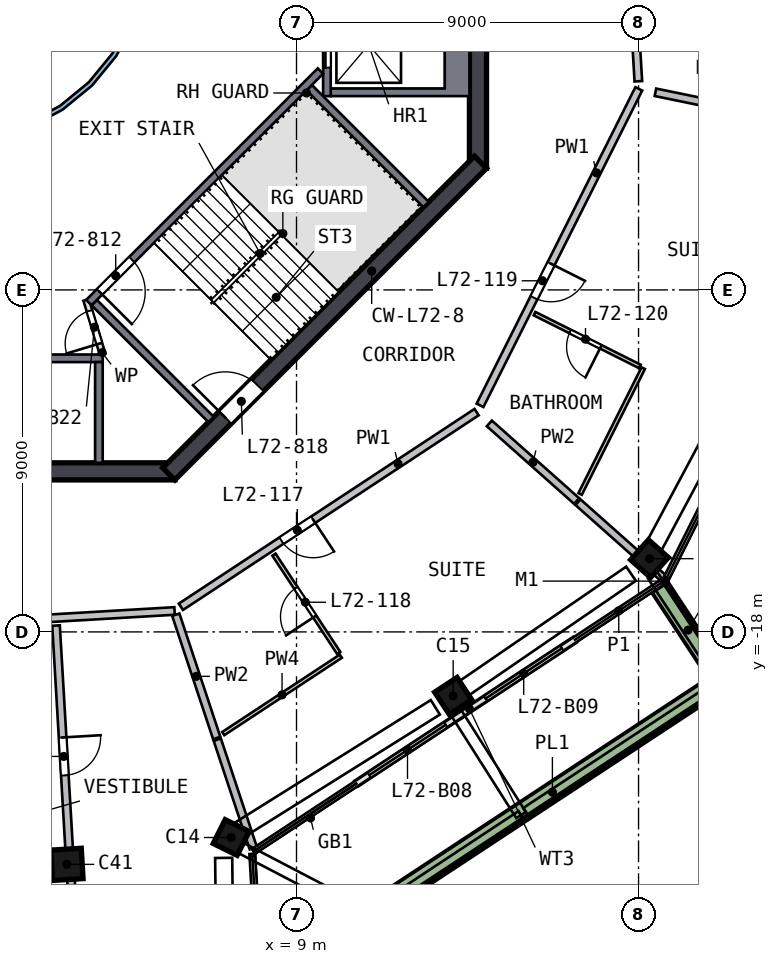
"""IFC4 building model, lengths in metres.
Left out: names, types, materials, properties, quantities, classifications, styles, units other than length and angle.
Written with IfcOpenShell. Run it as: python <this file> out.ifc"""

import sys

from ifc_helpers import new_model, si_unit, direction, frame, frame_2d, origin, origin_2d, place, context, subcontext, project, spatial, polyline, rectangle, outline, extrude, element, fill, save


model = new_model("IFC4")
c1 = context("Model", 3, precision=1e-05, world=origin(), true_north=direction((0.0, 1.0)))
c2 = subcontext(c1, "Body", "Model", "MODEL_VIEW")
j1 = project(units=[si_unit("LENGTHUNIT", "METRE"), si_unit("PLANEANGLEUNIT", "RADIAN")], contexts=[c1])
p1 = place(None, origin())
s1 = spatial("IfcSite", under=j1, at=p1, CompositionType="ELEMENT")
p2 = place(p1, origin())
s2 = spatial("IfcBuilding", under=s1, at=p2, CompositionType="ELEMENT")
p3 = place(p2, frame((0.0, 0.0, 291.5)))
s3 = spatial("IfcBuildingStorey", under=s2, at=p3, CompositionType="ELEMENT", Elevation=291.5)
p4 = place(p3, frame((7.147, -23.452, 0.0), z_axis=(0.111206882, 0.034889924, 0.993184637), x_axis=(-0.440961919, -0.893883559, 0.080776048)))
e1 = element("IfcColumn", 1, at=p4, inside=s3, PredefinedType="COLUMN", context=c2, shape_type="SweptSolid", body=[
    extrude(rectangle(XDim=0.7, YDim=0.7, at=origin_2d()), origin(), (0.0, 0.0, 1.0), 3.212),
])
p5 = place(p3, frame((13.01, -19.76, 0.0), z_axis=(0.093463516, 0.062663903, 0.993648734), x_axis=(0.829982551, 0.546321949, -0.112522412)))
e2 = element("IfcColumn", 2, at=p5, inside=s3, PredefinedType="COLUMN", context=c2, shape_type="SweptSolid", body=[
    extrude(rectangle(XDim=0.7, YDim=0.7, at=origin_2d()), origin(), (0.0, 0.0, 1.0), 3.21),
])
p6 = place(p3, frame((18.196, -16.178, 0.0), z_axis=(0.076247429, 0.087194218, 0.993269096), x_axis=(-0.660166681, -0.742135032, 0.115825506)))
e3 = element("IfcColumn", 3, at=p6, inside=s3, PredefinedType="COLUMN", context=c2, shape_type="SweptSolid", body=[
    extrude(rectangle(XDim=0.7, YDim=0.7, at=origin_2d()), origin(), (0.0, 0.0, 1.0), 3.212),
])
p7 = place(p3, frame((2.819, -24.135, 0.0), z_axis=(0.114641131, 0.014368152, 0.993303059), x_axis=(0.059498307, -0.998199687, 0.007572042)))
e4 = element("IfcColumn", 4, at=p7, inside=s3, PredefinedType="COLUMN", context=c2, shape_type="SweptSolid", body=[
    extrude(rectangle(XDim=0.8, YDim=0.8, at=origin_2d()), origin(), (0.0, 0.0, 1.0), 3.211),
])
p8 = place(p3, frame((13.775, -5.799, 0.0), z_axis=(0.0, 0.0, 1.0), x_axis=(0.0, 1.0, 0.0)))
e5 = element("IfcWall", 5, at=p8, inside=s3, PredefinedType="SHEAR", context=c2, shape_type="SweptSolid", body=[
    extrude(rectangle(XDim=11.598, YDim=0.45, at=frame_2d((5.799, 0.0))), origin(), (0.0, 0.0, 1.0), 3.5),
])
p9 = place(p8, frame((4.899, 0.0, 0.0)))
e6 = element("IfcOpeningElement", 6, at=p9, cuts=e5, PredefinedType="OPENING", context=c2, shape_type="SweptSolid", body=[
    extrude(rectangle(XDim=1.8, YDim=2.1, at=frame_2d((0.9, 1.05))), frame((0.0, 0.235, 0.0), z_axis=(0.0, -1.0, 0.0), x_axis=(1.0, 0.0, 0.0)), (0.0, 0.0, 1.0), 0.47),
])
p10 = place(p3, frame((-5.799, -13.775, 0.0), z_axis=(0.0, 0.0, 1.0), x_axis=(1.0, 0.0, 0.0)))
e7 = element("IfcWall", 7, at=p10, inside=s3, PredefinedType="SHEAR", context=c2, shape_type="SweptSolid", body=[
    extrude(rectangle(XDim=11.598, YDim=0.45, at=frame_2d((5.799, 0.0))), origin(), (0.0, 0.0, 1.0), 3.5),
])
p11 = place(p3, frame((5.64, -13.841, 0.0), z_axis=(0.0, 0.0, 1.0), x_axis=(0.707106781, 0.707106781, 0.0)))
e8 = element("IfcWall", 8, at=p11, inside=s3, PredefinedType="SHEAR", context=c2, shape_type="SweptSolid", body=[
    extrude(rectangle(XDim=11.598, YDim=0.45, at=frame_2d((5.799, 0.0))), origin(), (0.0, 0.0, 1.0), 3.5),
])
p12 = place(p11, frame((2.099, 0.0, 0.0)))
e9 = element("IfcOpeningElement", 9, at=p12, cuts=e8, PredefinedType="OPENING", context=c2, shape_type="SweptSolid", body=[
    extrude(rectangle(XDim=1.2, YDim=2.1, at=frame_2d((0.6, 1.05))), frame((0.0, 0.235, 0.0), z_axis=(0.0, -1.0, 0.0), x_axis=(1.0, 0.0, 0.0)), (0.0, 0.0, 1.0), 0.47),
])
p13 = place(p3, frame((10.584, -21.986, 0.0), z_axis=(0.0, 0.0, 1.0), x_axis=(0.835249124, 0.549871714, 0.0)))
e10 = element("IfcWall", 10, at=p13, inside=s3, PredefinedType="SOLIDWALL", context=c2, shape_type="SweptSolid", body=[
    extrude(rectangle(XDim=3.25, YDim=0.15, at=frame_2d((1.625, 0.0))), origin(), (0.0, 0.0, 1.0), 2.525),
])
p14 = place(p13, frame((0.4, 0.0, 0.0)))
e11 = element("IfcOpeningElement", 11, at=p14, cuts=e10, PredefinedType="OPENING", context=c2, shape_type="SweptSolid", body=[
    extrude(rectangle(XDim=2.4, YDim=2.4, at=frame_2d((1.2, 1.2))), frame((0.0, 0.085, 0.0), z_axis=(0.0, -1.0, 0.0), x_axis=(1.0, 0.0, 0.0)), (0.0, 0.0, 1.0), 0.17),
])
p15 = place(p3, frame((13.298, -20.199, 0.0), z_axis=(0.0, 0.0, 1.0), x_axis=(0.83523978, 0.549885906, 0.0)))
e12 = element("IfcWall", 12, at=p15, inside=s3, PredefinedType="SOLIDWALL", context=c2, shape_type="SweptSolid", body=[
    extrude(rectangle(XDim=3.611, YDim=0.15, at=frame_2d((1.806, 0.0))), origin(), (0.0, 0.0, 1.0), 2.525),
])
p16 = place(p15, frame((0.811, 0.0, 0.0)))
e13 = element("IfcOpeningElement", 13, at=p16, cuts=e12, PredefinedType="OPENING", context=c2, shape_type="SweptSolid", body=[
    extrude(rectangle(XDim=2.4, YDim=2.4, at=frame_2d((1.2, 1.2))), frame((0.0, 0.085, 0.0), z_axis=(0.0, -1.0, 0.0), x_axis=(1.0, 0.0, 0.0)), (0.0, 0.0, 1.0), 0.17),
])
p17 = place(p3, frame((11.076, -25.284, 0.0), z_axis=(0.0, 0.0, 1.0), x_axis=(0.83522923, 0.549901931, 0.0)))
e14 = element("IfcWall", 14, at=p17, inside=s3, PredefinedType="SOLIDWALL", context=c2, shape_type="SweptSolid", body=[
    extrude(rectangle(XDim=11.153, YDim=0.5, at=frame_2d((5.576, 0.0))), origin(), (0.0, 0.0, 1.0), 0.7),
])
p18 = place(p3, frame((20.044, -19.08, 0.0), z_axis=(0.0, 0.0, 1.0), x_axis=(-0.549868995, 0.835250913, 0.0)))
e15 = element("IfcWall", 15, at=p18, inside=s3, PredefinedType="SOLIDWALL", context=c2, shape_type="SweptSolid", body=[
    extrude(rectangle(XDim=2.699, YDim=0.5, at=frame_2d((1.35, 0.0))), origin(), (0.0, 0.0, 1.0), 0.7),
])
p19 = place(p3, origin())
e16 = element("IfcWall", 16, at=p19, inside=s3, PredefinedType="SOLIDWALL", context=c2, shape_type="SweptSolid", body=[
    extrude(outline(polyline([(13.55, -3.9), (9.9, -3.9), (9.9, -3.7), (12.9, -3.7), (12.9, -1.4), (9.9, -1.4), (9.9, -1.2), (13.55, -1.2), (13.55, -3.9)])), origin(), (0.0, 0.0, 1.0), 3.19),
])
p20 = place(p3, frame((9.8, -1.2, 0.0), z_axis=(0.0, 0.0, 1.0), x_axis=(0.0, -1.0, 0.0)))
e17 = element("IfcWall", 17, at=p20, inside=s3, PredefinedType="SOLIDWALL", context=c2, shape_type="SweptSolid", body=[
    extrude(rectangle(XDim=2.7, YDim=0.2, at=frame_2d((1.35, 0.0))), origin(), (0.0, 0.0, 1.0), 3.19),
])
p21 = place(p20, frame((0.75, 0.0, 0.0)))
e18 = element("IfcOpeningElement", 18, at=p21, cuts=e17, PredefinedType="OPENING", context=c2, shape_type="SweptSolid", body=[
    extrude(rectangle(XDim=1.2, YDim=2.1, at=frame_2d((0.6, 1.05))), frame((0.0, 0.11, 0.0), z_axis=(0.0, -1.0, 0.0), x_axis=(1.0, 0.0, 0.0)), (0.0, 0.0, 1.0), 0.22),
])
p22 = place(p3, frame((-3.9, -10.8, 0.0), z_axis=(0.0, 0.0, 1.0), x_axis=(1.0, 0.0, 0.0)))
e19 = element("IfcWall", 19, at=p22, inside=s3, PredefinedType="SOLIDWALL", context=c2, shape_type="SweptSolid", body=[
    extrude(rectangle(XDim=7.8, YDim=0.2, at=frame_2d((3.9, 0.0))), origin(), (0.0, 0.0, 1.0), 3.19),
])
p23 = place(p22, frame((3.45, 0.0, 0.0)))
e20 = element("IfcOpeningElement", 20, at=p23, cuts=e19, PredefinedType="OPENING", context=c2, shape_type="SweptSolid", body=[
    extrude(rectangle(XDim=0.9, YDim=2.1, at=frame_2d((0.45, 1.05))), frame((0.0, 0.11, 0.0), z_axis=(0.0, -1.0, 0.0), x_axis=(1.0, 0.0, 0.0)), (0.0, 0.0, 1.0), 0.22),
])
p24 = place(p3, frame((3.8, -10.9, 0.0), z_axis=(0.0, 0.0, 1.0), x_axis=(0.0, -1.0, 0.0)))
e21 = element("IfcWall", 21, at=p24, inside=s3, PredefinedType="SOLIDWALL", context=c2, shape_type="SweptSolid", body=[
    extrude(rectangle(XDim=2.65, YDim=0.2, at=frame_2d((1.325, 0.0))), origin(), (0.0, 0.0, 1.0), 3.19),
])
p25 = place(p3, frame((9.629, -3.24, 0.0), z_axis=(0.0, 0.0, 1.0), x_axis=(-0.707120946, -0.707092617, 0.0)))
e22 = element("IfcWall", 22, at=p25, inside=s3, PredefinedType="SOLIDWALL", context=c2, shape_type="SweptSolid", body=[
    extrude(rectangle(XDim=8.618, YDim=0.2, at=frame_2d((4.309, 0.0))), origin(), (0.0, 0.0, 1.0), 3.19),
])
p26 = place(p25, frame((7.018, 0.0, 0.0)))
e23 = element("IfcOpeningElement", 23, at=p26, cuts=e22, PredefinedType="OPENING", context=c2, shape_type="SweptSolid", body=[
    extrude(rectangle(XDim=1.2, YDim=2.1, at=frame_2d((0.6, 1.05))), frame((0.0, 0.11, 0.0), z_axis=(0.0, -1.0, 0.0), x_axis=(1.0, 0.0, 0.0)), (0.0, 0.0, 1.0), 0.22),
])
for number, where, z_axis, x_axis in (
    (24, (3.677, -9.334, 0.0), (0.0, 0.0, 1.0), (0.707, -0.707, 0.0)),
    (25, (9.334, -3.677, 0.0), (0.0, 0.0, 1.0), (0.707, -0.707, 0.0)),
):
    element("IfcWall", number, at=place(p3, frame(where, z_axis=z_axis, x_axis=x_axis)), inside=s3, PredefinedType="SOLIDWALL", context=c2, shape_type="SweptSolid", body=[
        extrude(rectangle(XDim=4.35, YDim=0.2, at=frame_2d((2.175, 0.0))), origin(), (0.0, 0.0, 1.0), 3.19),
    ])
p27 = place(p3, frame((3.9, -10.7, 0.0), z_axis=(0.0, 0.0, 1.0), x_axis=(-0.289808785, 0.957084567, 0.0)))
e26 = element("IfcWall", 26, at=p27, inside=s3, PredefinedType="PARTITIONING", context=c2, shape_type="SweptSolid", body=[
    extrude(rectangle(XDim=1.501, YDim=0.15, at=frame_2d((0.75, 0.0))), origin(), (0.0, 0.0, 1.0), 3.19),
])
p28 = place(p27, frame((0.301, 0.0, 0.0)))
e27 = element("IfcOpeningElement", 27, at=p28, cuts=e26, PredefinedType="OPENING", context=c2, shape_type="SweptSolid", body=[
    extrude(rectangle(XDim=0.9, YDim=2.1, at=frame_2d((0.45, 1.05))), frame((0.0, 0.085, 0.0), z_axis=(0.0, -1.0, 0.0), x_axis=(1.0, 0.0, 0.0)), (0.0, 0.0, 1.0), 0.17),
])
p29 = place(p3, origin())
e28 = element("IfcWall", 28, at=p29, inside=s3, PredefinedType="SOLIDWALL", context=c2, shape_type="SweptSolid", body=[
    extrude(outline(polyline([(5.021, -0.999), (4.73, -1.959), (4.257, -2.844), (3.62, -3.62), (2.844, -4.257), (1.959, -4.73), (0.999, -5.021), (0.0, -5.12), (-0.999, -5.021), (-1.959, -4.73), (-2.844, -4.257), (-3.62, -3.62), (-4.257, -2.844), (-4.73, -1.959), (-5.021, -0.999), (-5.12, 0.0), (-5.021, 0.999), (-4.73, 1.959), (-4.257, 2.844), (-3.62, 3.62), (-2.844, 4.257), (-1.959, 4.73), (-0.999, 5.021), (0.0, 5.12), (0.999, 5.021), (1.959, 4.73), (2.844, 4.257), (3.62, 3.62), (4.257, 2.844), (4.73, 1.959), (5.021, 0.999), (5.12, 0.0), (5.021, -0.999)]), holes=[polyline([(4.904, 0.976), (4.619, 1.913), (4.157, 2.778), (3.535, 3.535), (2.778, 4.157), (1.913, 4.619), (0.976, 4.904), (0.0, 5.0), (-0.976, 4.904), (-1.913, 4.619), (-2.778, 4.157), (-3.535, 3.535), (-4.157, 2.778), (-4.619, 1.913), (-4.904, 0.976), (-5.0, 0.0), (-4.904, -0.976), (-4.619, -1.913), (-4.157, -2.778), (-3.535, -3.535), (-2.778, -4.157), (-1.913, -4.619), (-0.976, -4.904), (0.0, -5.0), (0.976, -4.904), (1.913, -4.619), (2.778, -4.157), (3.535, -3.535), (4.157, -2.778), (4.619, -1.913), (4.904, -0.976), (5.0, 0.0), (4.904, 0.976)])]), origin(), (0.0, 0.0, 1.0), 3.19),
])
p30 = place(p3, frame((5.791, -17.449, 0.0), z_axis=(0.0, 0.0, 1.0), x_axis=(-0.998281884, -0.058594193, 0.0)))
e29 = element("IfcWall", 29, at=p30, inside=s3, PredefinedType="SOLIDWALL", context=c2, shape_type="SweptSolid", body=[
    extrude(rectangle(XDim=9.517, YDim=0.2, at=frame_2d((4.758, 0.0))), origin(), (0.0, 0.0, 1.0), 3.19),
])
p31 = place(p30, frame((3.836, 0.0, 0.0)))
e30 = element("IfcOpeningElement", 30, at=p31, cuts=e29, PredefinedType="OPENING", context=c2, shape_type="SweptSolid", body=[
    extrude(rectangle(XDim=1.8, YDim=2.1, at=frame_2d((0.9, 1.05))), frame((0.0, 0.11, 0.0), z_axis=(0.0, -1.0, 0.0), x_axis=(1.0, 0.0, 0.0)), (0.0, 0.0, 1.0), 0.22),
])
p32 = place(p3, frame((13.74, -12.216, 0.0), z_axis=(0.0, 0.0, 1.0), x_axis=(-0.835237502, -0.549889366, 0.0)))
e31 = element("IfcWall", 31, at=p32, inside=s3, PredefinedType="SOLIDWALL", context=c2, shape_type="SweptSolid", body=[
    extrude(rectangle(XDim=9.316, YDim=0.2, at=frame_2d((4.658, 0.0))), origin(), (0.0, 0.0, 1.0), 3.19),
])
p33 = place(p32, frame((5.15, 0.0, 0.0)))
e32 = element("IfcOpeningElement", 32, at=p33, cuts=e31, PredefinedType="OPENING", context=c2, shape_type="SweptSolid", body=[
    extrude(rectangle(XDim=1.0, YDim=2.1, at=frame_2d((0.5, 1.05))), frame((0.0, 0.11, 0.0), z_axis=(0.0, -1.0, 0.0), x_axis=(1.0, 0.0, 0.0)), (0.0, 0.0, 1.0), 0.22),
])
p34 = place(p3, frame((18.007, -3.709, 0.0), z_axis=(0.0, 0.0, 1.0), x_axis=(-0.448376743, -0.893844671, 0.0)))
e33 = element("IfcWall", 33, at=p34, inside=s3, PredefinedType="SOLIDWALL", context=c2, shape_type="SweptSolid", body=[
    extrude(rectangle(XDim=9.316, YDim=0.2, at=frame_2d((4.658, 0.0))), origin(), (0.0, 0.0, 1.0), 3.19),
])
p35 = place(p34, frame((5.15, 0.0, 0.0)))
e34 = element("IfcOpeningElement", 34, at=p35, cuts=e33, PredefinedType="OPENING", context=c2, shape_type="SweptSolid", body=[
    extrude(rectangle(XDim=1.0, YDim=2.1, at=frame_2d((0.5, 1.05))), frame((0.0, 0.11, 0.0), z_axis=(0.0, -1.0, 0.0), x_axis=(1.0, 0.0, 0.0)), (0.0, 0.0, 1.0), 0.22),
])
p36 = place(p3, frame((17.449, 5.791, 0.0), z_axis=(0.0, 0.0, 1.0), x_axis=(0.058619102, -0.998280422, 0.0)))
e35 = element("IfcWall", 35, at=p36, inside=s3, PredefinedType="SOLIDWALL", context=c2, shape_type="SweptSolid", body=[
    extrude(rectangle(XDim=9.317, YDim=0.2, at=frame_2d((4.658, 0.0))), origin(), (0.0, 0.0, 1.0), 3.19),
])
p37 = place(p36, frame((1.9, 0.0, 0.0)))
e36 = element("IfcOpeningElement", 36, at=p37, cuts=e35, PredefinedType="OPENING", context=c2, shape_type="SweptSolid", body=[
    extrude(rectangle(XDim=1.0, YDim=2.1, at=frame_2d((0.5, 1.05))), frame((0.0, 0.11, 0.0), z_axis=(0.0, -1.0, 0.0), x_axis=(1.0, 0.0, 0.0)), (0.0, 0.0, 1.0), 0.22),
])
p38 = place(p3, frame((2.672, -17.833, 0.0), z_axis=(0.0, 0.0, 1.0), x_axis=(0.058606715, -0.998281149, 0.0)))
e37 = element("IfcWall", 37, at=p38, inside=s3, PredefinedType="SOLIDWALL", context=c2, shape_type="SweptSolid", body=[
    extrude(rectangle(XDim=10.302, YDim=0.2, at=frame_2d((5.151, 0.0))), origin(), (0.0, 0.0, 1.0), 3.19),
])
p39 = place(p38, frame((2.95, 0.0, 0.0)))
e38 = element("IfcOpeningElement", 38, at=p39, cuts=e37, PredefinedType="OPENING", context=c2, shape_type="SweptSolid", body=[
    extrude(rectangle(XDim=1.0, YDim=2.1, at=frame_2d((0.5, 1.05))), frame((0.0, 0.11, 0.0), z_axis=(0.0, -1.0, 0.0), x_axis=(1.0, 0.0, 0.0)), (0.0, 0.0, 1.0), 0.22),
])
p40 = place(p3, frame((5.823, -17.547, 0.0), z_axis=(0.0, 0.0, 1.0), x_axis=(0.31502768, -0.949082484, 0.0)))
e39 = element("IfcWall", 39, at=p40, inside=s3, PredefinedType="SOLIDWALL", context=c2, shape_type="SweptSolid", body=[
    extrude(rectangle(XDim=3.418, YDim=0.2, at=frame_2d((1.709, 0.0))), origin(), (0.0, 0.0, 1.0), 3.19),
])
p41 = place(p3, frame((6.915, -20.835, 0.0), z_axis=(0.0, 0.0, 1.0), x_axis=(0.31496277, -0.949104027, 0.0)))
e40 = element("IfcWall", 40, at=p41, inside=s3, PredefinedType="SOLIDWALL", context=c2, shape_type="SweptSolid", body=[
    extrude(rectangle(XDim=3.011, YDim=0.2, at=frame_2d((1.506, 0.0))), origin(), (0.0, 0.0, 1.0), 3.19),
])
p42 = place(p3, frame((14.074, -12.513, 0.0), z_axis=(0.0, 0.0, 1.0), x_axis=(0.747339221, -0.66444269, 0.0)))
e41 = element("IfcWall", 41, at=p42, inside=s3, PredefinedType="SOLIDWALL", context=c2, shape_type="SweptSolid", body=[
    extrude(rectangle(XDim=3.075, YDim=0.2, at=frame_2d((1.537, 0.0))), origin(), (0.0, 0.0, 1.0), 3.19),
])
p43 = place(p3, frame((16.406, -14.586, 0.0), z_axis=(0.0, 0.0, 1.0), x_axis=(0.747319853, -0.664464474, 0.0)))
e42 = element("IfcWall", 42, at=p43, inside=s3, PredefinedType="SOLIDWALL", context=c2, shape_type="SweptSolid", body=[
    extrude(rectangle(XDim=3.011, YDim=0.2, at=frame_2d((1.506, 0.0))), origin(), (0.0, 0.0, 1.0), 3.19),
])
p44 = place(p3, frame((18.445, -3.8, 0.0), z_axis=(0.0, 0.0, 1.0), x_axis=(0.979434435, -0.2017627, 0.0)))
e43 = element("IfcWall", 43, at=p44, inside=s3, PredefinedType="SOLIDWALL", context=c2, shape_type="SweptSolid", body=[
    extrude(rectangle(XDim=3.075, YDim=0.2, at=frame_2d((1.537, 0.0))), origin(), (0.0, 0.0, 1.0), 3.19),
])
p45 = place(p3, frame((10.166, -18.639, 0.0), z_axis=(0.0, 0.0, 1.0), x_axis=(-0.835230673, -0.54989974, 0.0)))
e44 = element("IfcWall", 44, at=p45, inside=s3, PredefinedType="PARTITIONING", context=c2, shape_type="SweptSolid", body=[
    extrude(rectangle(XDim=3.704, YDim=0.1, at=frame_2d((1.852, 0.0))), origin(), (0.0, 0.0, 1.0), 3.19),
])
p46 = place(p3, frame((10.111, -18.555, 0.0), z_axis=(0.0, 0.0, 1.0), x_axis=(-0.549947695, 0.835199098, 0.0)))
e45 = element("IfcWall", 45, at=p46, inside=s3, PredefinedType="PARTITIONING", context=c2, shape_type="SweptSolid", body=[
    extrude(rectangle(XDim=3.1, YDim=0.1, at=frame_2d((1.55, 0.0))), origin(), (0.0, 0.0, 1.0), 3.19),
])
p47 = place(p46, frame((1.15, 0.0, 0.0)))
e46 = element("IfcOpeningElement", 46, at=p47, cuts=e45, PredefinedType="OPENING", context=c2, shape_type="SweptSolid", body=[
    extrude(rectangle(XDim=0.9, YDim=2.1, at=frame_2d((0.45, 1.05))), frame((0.0, 0.06, 0.0), z_axis=(0.0, -1.0, 0.0), x_axis=(1.0, 0.0, 0.0)), (0.0, 0.0, 1.0), 0.12),
])
p48 = place(p3, frame((18.034, -11.014, 0.0), z_axis=(0.0, 0.0, 1.0), x_axis=(-0.89382788, 0.448410216, 0.0)))
e47 = element("IfcWall", 47, at=p48, inside=s3, PredefinedType="PARTITIONING", context=c2, shape_type="SweptSolid", body=[
    extrude(rectangle(XDim=3.1, YDim=0.1, at=frame_2d((1.55, 0.0))), origin(), (0.0, 0.0, 1.0), 3.19),
])
p49 = place(p48, frame((1.15, 0.0, 0.0)))
e48 = element("IfcOpeningElement", 48, at=p49, cuts=e47, PredefinedType="OPENING", context=c2, shape_type="SweptSolid", body=[
    extrude(rectangle(XDim=0.9, YDim=2.1, at=frame_2d((0.45, 1.05))), frame((0.0, 0.06, 0.0), z_axis=(0.0, -1.0, 0.0), x_axis=(1.0, 0.0, 0.0)), (0.0, 0.0, 1.0), 0.12),
])
p50 = place(p3, frame((18.124, -11.059, 0.0), z_axis=(0.0, 0.0, 1.0), x_axis=(-0.448399619, -0.893833196, 0.0)))
e49 = element("IfcWall", 49, at=p50, inside=s3, PredefinedType="PARTITIONING", context=c2, shape_type="SweptSolid", body=[
    extrude(rectangle(XDim=3.704, YDim=0.1, at=frame_2d((1.852, 0.0))), origin(), (0.0, 0.0, 1.0), 3.19),
])
p51 = place(p14, origin())
e50 = element("IfcDoor", 50, at=p51, inside=s3, OperationType="SLIDING_TO_RIGHT", PredefinedType="DOOR", context=c2, shape_type="SweptSolid", body=[
    extrude(rectangle(XDim=2.4, YDim=2.4, at=frame_2d((1.2, 1.2))), frame((0.0, 0.025, 0.0), z_axis=(0.0, -1.0, 0.0), x_axis=(1.0, 0.0, 0.0)), (0.0, 0.0, 1.0), 0.05),
])
fill(e11, e50)
p52 = place(p16, origin())
e51 = element("IfcDoor", 51, at=p52, inside=s3, OperationType="SLIDING_TO_LEFT", PredefinedType="DOOR", context=c2, shape_type="SweptSolid", body=[
    extrude(rectangle(XDim=2.4, YDim=2.4, at=frame_2d((1.2, 1.2))), frame((0.0, 0.025, 0.0), z_axis=(0.0, -1.0, 0.0), x_axis=(1.0, 0.0, 0.0)), (0.0, 0.0, 1.0), 0.05),
])
fill(e13, e51)
p53 = place(p21, origin())
e52 = element("IfcDoor", 52, at=p53, inside=s3, OperationType="DOUBLE_DOOR_SLIDING", PredefinedType="DOOR", context=c2, shape_type="SweptSolid", body=[
    extrude(rectangle(XDim=1.2, YDim=2.1, at=frame_2d((0.6, 1.05))), frame((0.0, 0.025, 0.0), z_axis=(0.0, -1.0, 0.0), x_axis=(1.0, 0.0, 0.0)), (0.0, 0.0, 1.0), 0.05),
])
fill(e18, e52)
p54 = place(p26, origin())
e53 = element("IfcDoor", 53, at=p54, inside=s3, OperationType="SINGLE_SWING_RIGHT", PredefinedType="DOOR", context=c2, shape_type="SweptSolid", body=[
    extrude(rectangle(XDim=1.2, YDim=2.1, at=frame_2d((0.6, 1.05))), frame((0.0, 0.025, 0.0), z_axis=(0.0, -1.0, 0.0), x_axis=(1.0, 0.0, 0.0)), (0.0, 0.0, 1.0), 0.05),
])
fill(e23, e53)
p55 = place(p12, origin())
e54 = element("IfcDoor", 54, at=p55, inside=s3, OperationType="SINGLE_SWING_LEFT", PredefinedType="DOOR", context=c2, shape_type="SweptSolid", body=[
    extrude(rectangle(XDim=1.2, YDim=2.1, at=frame_2d((0.6, 1.05))), frame((0.0, 0.025, 0.0), z_axis=(0.0, -1.0, 0.0), x_axis=(1.0, 0.0, 0.0)), (0.0, 0.0, 1.0), 0.05),
])
fill(e9, e54)
p56 = place(p28, origin())
e55 = element("IfcDoor", 55, at=p56, inside=s3, OperationType="SINGLE_SWING_LEFT", PredefinedType="DOOR", context=c2, shape_type="SweptSolid", body=[
    extrude(rectangle(XDim=0.9, YDim=2.1, at=frame_2d((0.45, 1.05))), frame((0.0, 0.025, 0.0), z_axis=(0.0, -1.0, 0.0), x_axis=(1.0, 0.0, 0.0)), (0.0, 0.0, 1.0), 0.05),
])
fill(e27, e55)
p57 = place(p39, origin())
e56 = element("IfcDoor", 56, at=p57, inside=s3, OperationType="SINGLE_SWING_LEFT", PredefinedType="DOOR", context=c2, shape_type="SweptSolid", body=[
    extrude(rectangle(XDim=1.0, YDim=2.1, at=frame_2d((0.5, 1.05))), frame((0.0, 0.025, 0.0), z_axis=(0.0, -1.0, 0.0), x_axis=(1.0, 0.0, 0.0)), (0.0, 0.0, 1.0), 0.05),
])
fill(e38, e56)
p58 = place(p33, origin())
e57 = element("IfcDoor", 57, at=p58, inside=s3, OperationType="SINGLE_SWING_LEFT", PredefinedType="DOOR", context=c2, shape_type="SweptSolid", body=[
    extrude(rectangle(XDim=1.0, YDim=2.1, at=frame_2d((0.5, 1.05))), frame((0.0, 0.025, 0.0), z_axis=(0.0, -1.0, 0.0), x_axis=(1.0, 0.0, 0.0)), (0.0, 0.0, 1.0), 0.05),
])
fill(e32, e57)
p59 = place(p47, origin())
e58 = element("IfcDoor", 58, at=p59, inside=s3, OperationType="SINGLE_SWING_LEFT", PredefinedType="DOOR", context=c2, shape_type="SweptSolid", body=[
    extrude(rectangle(XDim=0.9, YDim=2.1, at=frame_2d((0.45, 1.05))), frame((0.0, 0.025, 0.0), z_axis=(0.0, -1.0, 0.0), x_axis=(1.0, 0.0, 0.0)), (0.0, 0.0, 1.0), 0.05),
])
fill(e46, e58)
p60 = place(p35, origin())
e59 = element("IfcDoor", 59, at=p60, inside=s3, OperationType="SINGLE_SWING_LEFT", PredefinedType="DOOR", context=c2, shape_type="SweptSolid", body=[
    extrude(rectangle(XDim=1.0, YDim=2.1, at=frame_2d((0.5, 1.05))), frame((0.0, 0.025, 0.0), z_axis=(0.0, -1.0, 0.0), x_axis=(1.0, 0.0, 0.0)), (0.0, 0.0, 1.0), 0.05),
])
fill(e34, e59)
p61 = place(p49, origin())
e60 = element("IfcDoor", 60, at=p61, inside=s3, OperationType="SINGLE_SWING_LEFT", PredefinedType="DOOR", context=c2, shape_type="SweptSolid", body=[
    extrude(rectangle(XDim=0.9, YDim=2.1, at=frame_2d((0.45, 1.05))), frame((0.0, 0.025, 0.0), z_axis=(0.0, -1.0, 0.0), x_axis=(1.0, 0.0, 0.0)), (0.0, 0.0, 1.0), 0.05),
])
fill(e48, e60)
save(model, sys.argv[1])
